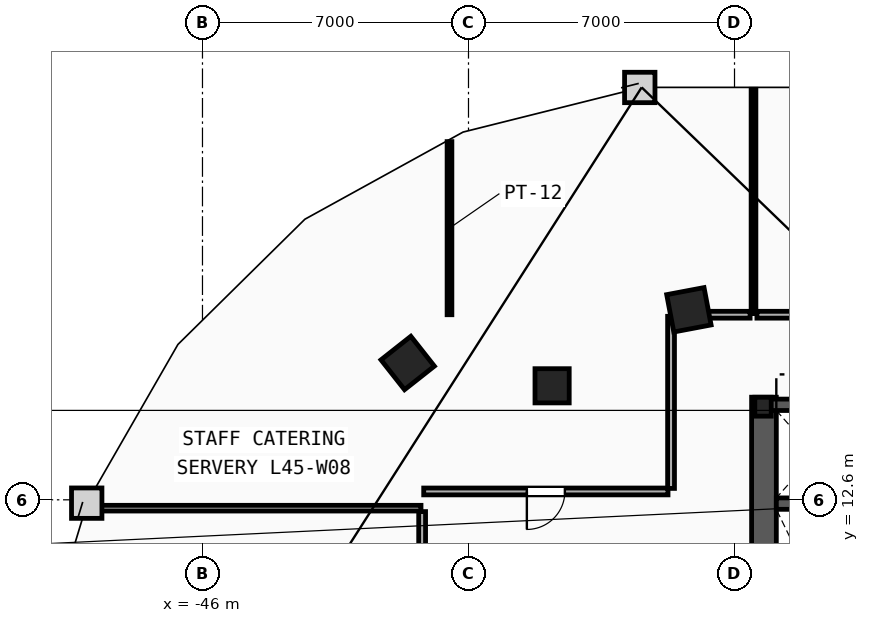
"""IFC4 building model, lengths in metres.
Left out: names, types, materials, properties, quantities, classifications, styles, units other than length and angle.
Written with IfcOpenShell. Run it as: python <this file> out.ifc"""

import sys

from ifc_helpers import new_model, si_unit, direction, frame, frame_2d, origin, origin_2d, place, context, subcontext, project, spatial, rectangle, i_section, extrude, element, fill, save


model = new_model("IFC4")
c1 = context("Model", 3, precision=1e-05, world=origin(), true_north=direction((0.0, 1.0)))
c2 = subcontext(c1, "Body", "Model", "MODEL_VIEW")
j1 = project(units=[si_unit("LENGTHUNIT", "METRE"), si_unit("PLANEANGLEUNIT", "RADIAN")], contexts=[c1])
p1 = place(None, origin())
s1 = spatial("IfcSite", under=j1, at=p1, CompositionType="ELEMENT")
p2 = place(p1, origin())
s2 = spatial("IfcBuilding", under=s1, at=p2, CompositionType="ELEMENT")
p3 = place(p2, frame((0.0, 0.0, 172.8)))
s3 = spatial("IfcBuildingStorey", under=s2, at=p3, CompositionType="ELEMENT", Elevation=172.8)
p4 = place(p3, frame((-31.25, 15.05, 0.0), z_axis=(0.0, 0.0, 1.0), x_axis=(1.0, 0.0, 0.0)))
e1 = element("IfcColumn", 1, at=p4, inside=s3, PredefinedType="COLUMN", context=c2, shape_type="SweptSolid", body=[
    extrude(i_section(OverallWidth=0.432, OverallDepth=0.498, WebThickness=0.056, FlangeThickness=0.089, FilletRadius=0.018, at=origin_2d()), origin(), (0.0, 0.0, 1.0), 3.6),
])
p5 = place(p3, frame((-36.8, 15.6, 0.0), z_axis=(0.0, 0.0, 1.0), x_axis=(1.0, 0.0, 0.0)))
e2 = element("IfcColumn", 2, at=p5, inside=s3, PredefinedType="COLUMN", context=c2, shape_type="SweptSolid", body=[
    extrude(rectangle(XDim=0.9, YDim=0.9, at=origin_2d()), origin(), (0.0, 0.0, 1.0), 3.6),
])
for number, where, z_axis, x_axis in (
    (3, (-33.2, 17.6, 0.0), (0.0, 0.0, 1.0), (-0.983, -0.186, 0.0)),
    (4, (-40.6, 16.2, 0.0), (0.0, 0.0, 1.0), (-0.785, -0.619, 0.0)),
):
    element("IfcColumn", number, at=place(p3, frame(where, z_axis=z_axis, x_axis=x_axis)), inside=s3, PredefinedType="COLUMN", context=c2, shape_type="SweptSolid", body=[
        extrude(rectangle(XDim=1.0, YDim=1.0, at=origin_2d()), origin(), (0.0, 0.0, 1.0), 3.6),
    ])
p6 = place(p3, frame((-31.225, 1.97, 0.0), z_axis=(0.0, 0.0, 1.0), x_axis=(0.0, 1.0, 0.0)))
e5 = element("IfcWall", 5, at=p6, inside=s3, PredefinedType="SHEAR", context=c2, shape_type="SweptSolid", body=[
    extrude(rectangle(XDim=13.33, YDim=0.65, at=frame_2d((6.665, 0.0))), origin(), (0.0, 0.0, 1.0), 3.36),
])
p7 = place(p3, frame((-30.9, 12.5, 0.0), z_axis=(0.0, 0.0, 1.0), x_axis=(1.0, 0.0, 0.0)))
e6 = element("IfcWall", 6, at=p7, inside=s3, PredefinedType="SHEAR", context=c2, shape_type="SweptSolid", body=[
    extrude(rectangle(XDim=3.16, YDim=0.3, at=frame_2d((1.58, 0.0))), origin(), (0.0, 0.0, 1.0), 3.36),
])
p8 = place(p3, frame((-31.2, 15.1, 0.0), z_axis=(0.0, 0.0, 1.0), x_axis=(1.0, 0.0, 0.0)))
e7 = element("IfcWall", 7, at=p8, inside=s3, PredefinedType="SHEAR", context=c2, shape_type="SweptSolid", body=[
    extrude(rectangle(XDim=2.5, YDim=0.3, at=frame_2d((1.25, 0.0))), origin(), (0.0, 0.0, 1.0), 3.36),
])
p9 = place(p3, frame((-49.024, 12.38, 0.0), z_axis=(0.0, 0.0, 1.0), x_axis=(1.0, 0.0, 0.0)))
e8 = element("IfcWall", 8, at=p9, inside=s3, PredefinedType="PARTITIONING", context=c2, shape_type="SweptSolid", body=[
    extrude(rectangle(XDim=8.774, YDim=0.15, at=frame_2d((4.387, 0.0))), origin(), (0.0, 0.0, 1.0), 3.36),
])
p10 = place(p3, frame((-39.5, 17.47, 0.0), z_axis=(0.0, 0.0, 1.0), x_axis=(0.0, 1.0, 0.0)))
e9 = element("IfcWall", 9, at=p10, inside=s3, PredefinedType="PARTITIONING", context=c2, shape_type="SweptSolid", body=[
    extrude(rectangle(XDim=4.555, YDim=0.125, at=frame_2d((2.278, 0.0))), origin(), (0.0, 0.0, 1.0), 3.36),
])
p11 = place(p3, frame((-31.5, 17.5, 0.0), z_axis=(0.0, 0.0, 1.0), x_axis=(0.0, 1.0, 0.0)))
e10 = element("IfcWall", 10, at=p11, inside=s3, PredefinedType="PARTITIONING", context=c2, shape_type="SweptSolid", body=[
    extrude(rectangle(XDim=5.902, YDim=0.125, at=frame_2d((2.951, 0.0))), origin(), (0.0, 0.0, 1.0), 3.36),
])
p12 = place(p3, frame((-40.22, 12.29, 0.0), z_axis=(0.0, 0.0, 1.0), x_axis=(0.0, -1.0, 0.0)))
e11 = element("IfcWall", 11, at=p12, inside=s3, PredefinedType="PARTITIONING", context=c2, shape_type="SweptSolid", body=[
    extrude(rectangle(XDim=1.869, YDim=0.18, at=frame_2d((0.934, 0.0))), origin(), (0.0, 0.0, 1.0), 3.36),
])
p13 = place(p3, frame((-33.75, 12.82, 0.0), z_axis=(0.0, 0.0, 1.0), x_axis=(-1.0, 0.0, 0.0)))
e12 = element("IfcWall", 12, at=p13, inside=s3, PredefinedType="PARTITIONING", context=c2, shape_type="SweptSolid", body=[
    extrude(rectangle(XDim=6.428, YDim=0.18, at=frame_2d((3.214, 0.0))), origin(), (0.0, 0.0, 1.0), 3.36),
])
p14 = place(p13, frame((2.714, 0.0, 0.0)))
e13 = element("IfcOpeningElement", 13, at=p14, cuts=e12, PredefinedType="OPENING", context=c2, shape_type="SweptSolid", body=[
    extrude(rectangle(XDim=1.0, YDim=2.15, at=frame_2d((0.5, 1.075))), frame((0.0, 0.1, 0.0), z_axis=(0.0, -1.0, 0.0), x_axis=(1.0, 0.0, 0.0)), (0.0, 0.0, 1.0), 0.2),
])
p15 = place(p3, frame((-33.67, 17.428, 0.0), z_axis=(0.0, 0.0, 1.0), x_axis=(0.0, -1.0, 0.0)))
e14 = element("IfcWall", 14, at=p15, inside=s3, PredefinedType="PARTITIONING", context=c2, shape_type="SweptSolid", body=[
    extrude(rectangle(XDim=4.529, YDim=0.18, at=frame_2d((2.264, 0.0))), origin(), (0.0, 0.0, 1.0), 3.36),
])
p16 = place(p3, frame((-31.59, 17.47, 0.0), z_axis=(0.0, 0.0, 1.0), x_axis=(-1.0, 0.0, 0.0)))
e15 = element("IfcWall", 15, at=p16, inside=s3, PredefinedType="PARTITIONING", context=c2, shape_type="SweptSolid", body=[
    extrude(rectangle(XDim=2.038, YDim=0.18, at=frame_2d((1.019, 0.0))), origin(), (0.0, 0.0, 1.0), 3.36),
])
p17 = place(p3, frame((-24.59, 17.47, 0.0), z_axis=(0.0, 0.0, 1.0), x_axis=(-1.0, 0.0, 0.0)))
e16 = element("IfcWall", 16, at=p17, inside=s3, PredefinedType="PARTITIONING", context=c2, shape_type="SweptSolid", body=[
    extrude(rectangle(XDim=6.82, YDim=0.18, at=frame_2d((3.41, 0.0))), origin(), (0.0, 0.0, 1.0), 3.36),
])
p18 = place(p17, frame((2.91, 0.0, 0.0)))
e17 = element("IfcOpeningElement", 17, at=p18, cuts=e16, PredefinedType="OPENING", context=c2, shape_type="SweptSolid", body=[
    extrude(rectangle(XDim=1.0, YDim=2.15, at=frame_2d((0.5, 1.075))), frame((0.0, 0.1, 0.0), z_axis=(0.0, -1.0, 0.0), x_axis=(1.0, 0.0, 0.0)), (0.0, 0.0, 1.0), 0.2),
])
p19 = place(p14, origin())
e18 = element("IfcDoor", 18, at=p19, inside=s3, OperationType="SINGLE_SWING_RIGHT", PredefinedType="DOOR", context=c2, shape_type="SweptSolid", body=[
    extrude(rectangle(XDim=1.0, YDim=2.15, at=frame_2d((0.5, 1.075))), frame((0.0, 0.025, 0.0), z_axis=(0.0, -1.0, 0.0), x_axis=(1.0, 0.0, 0.0)), (0.0, 0.0, 1.0), 0.05),
])
fill(e13, e18)
save(model, sys.argv[1])
